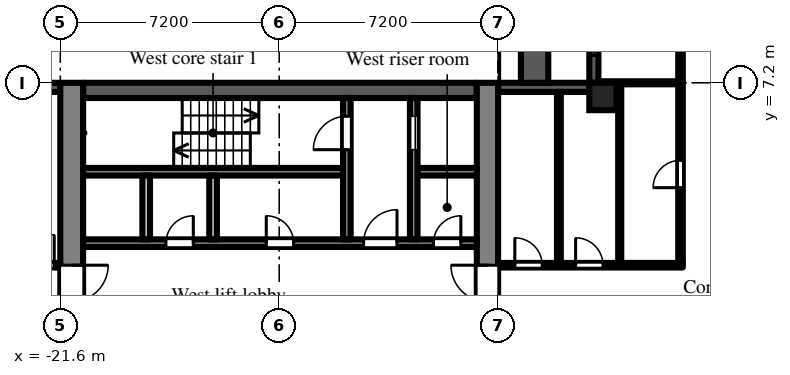
"""IFC4 building model, lengths in metres.
Left out: names, types, materials, properties, quantities, classifications, styles, units other than length and angle.
Written with IfcOpenShell. Run it as: python <this file> out.ifc"""

import sys

from ifc_helpers import new_model, si_unit, direction, frame, frame_2d, origin, origin_2d, place, context, subcontext, project, spatial, rectangle, extrude, element, fill, save


model = new_model("IFC4")
c1 = context("Model", 3, precision=1e-05, world=origin(), true_north=direction((0.0, 1.0)))
c2 = subcontext(c1, "Body", "Model", "MODEL_VIEW")
j1 = project(units=[si_unit("LENGTHUNIT", "METRE"), si_unit("PLANEANGLEUNIT", "RADIAN")], contexts=[c1])
p1 = place(None, origin())
s1 = spatial("IfcSite", under=j1, at=p1, CompositionType="ELEMENT")
p2 = place(p1, origin())
s2 = spatial("IfcBuilding", under=s1, at=p2, CompositionType="ELEMENT")
p3 = place(p2, frame((0.0, 0.0, 59.7)))
s3 = spatial("IfcBuildingStorey", under=s2, at=p3, CompositionType="ELEMENT", Elevation=59.7)
p4 = place(p3, frame((-3.75, 6.75, 0.0), z_axis=(0.0, 0.0, 1.0), x_axis=(1.0, 0.0, 0.0)))
e1 = element("IfcColumn", 1, at=p4, inside=s3, PredefinedType="COLUMN", context=c2, shape_type="SweptSolid", body=[
    extrude(rectangle(XDim=0.9, YDim=0.9, at=origin_2d()), origin(), (0.0, 0.0, 1.0), 3.0),
])
p5 = place(p3, frame((-4.05, 14.4, 0.0), z_axis=(0.0, 0.0, 1.0), x_axis=(0.0, -1.0, 0.0)))
e2 = element("IfcWall", 2, at=p5, inside=s3, PredefinedType="SOLIDWALL", context=c2, shape_type="SweptSolid", body=[
    extrude(rectangle(XDim=7.2, YDim=0.3, at=frame_2d((3.6, 0.0))), origin(), (0.0, 0.0, 1.0), 2.55),
])
p6 = place(p5, frame((3.0, 0.0, 0.0)))
e3 = element("IfcOpeningElement", 3, at=p6, cuts=e2, PredefinedType="OPENING", context=c2, shape_type="SweptSolid", body=[
    extrude(rectangle(XDim=1.2, YDim=2.05, at=frame_2d((0.6, 1.025))), frame((0.0, 0.16, 0.0), z_axis=(0.0, -1.0, 0.0), x_axis=(1.0, 0.0, 0.0)), (0.0, 0.0, 1.0), 0.32),
])
p7 = place(p5, frame((0.9, 0.0, 0.2)))
e4 = element("IfcOpeningElement", 4, at=p7, cuts=e2, PredefinedType="OPENING", context=c2, shape_type="SweptSolid", body=[
    extrude(rectangle(XDim=1.8, YDim=1.85, at=frame_2d((0.9, 0.925))), frame((0.0, 0.16, 0.0), z_axis=(0.0, -1.0, 0.0), x_axis=(1.0, 0.0, 0.0)), (0.0, 0.0, 1.0), 0.32),
])
p8 = place(p5, frame((4.5, 0.0, 0.2)))
e5 = element("IfcOpeningElement", 5, at=p8, cuts=e2, PredefinedType="OPENING", context=c2, shape_type="SweptSolid", body=[
    extrude(rectangle(XDim=1.8, YDim=1.85, at=frame_2d((0.9, 0.925))), frame((0.0, 0.16, 0.0), z_axis=(0.0, -1.0, 0.0), x_axis=(1.0, 0.0, 0.0)), (0.0, 0.0, 1.0), 0.32),
])
p9 = place(p3, frame((-4.2, 7.05, 0.0), z_axis=(0.0, 0.0, 1.0), x_axis=(-1.0, 0.0, 0.0)))
e6 = element("IfcWall", 6, at=p9, inside=s3, PredefinedType="SOLIDWALL", context=c2, shape_type="SweptSolid", body=[
    extrude(rectangle(XDim=3.0, YDim=0.3, at=frame_2d((1.5, 0.0))), origin(), (0.0, 0.0, 1.0), 2.55),
])
p10 = place(p3, frame((-21.6, 7.05, 0.0), z_axis=(0.0, 0.0, 1.0), x_axis=(-1.0, 0.0, 0.0)))
e7 = element("IfcWall", 7, at=p10, inside=s3, PredefinedType="SOLIDWALL", context=c2, shape_type="SweptSolid", body=[
    extrude(rectangle(XDim=2.7, YDim=0.3, at=frame_2d((1.35, 0.0))), origin(), (0.0, 0.0, 1.0), 2.1),
])
p11 = place(p10, frame((0.75, 0.0, 0.2)))
e8 = element("IfcOpeningElement", 8, at=p11, cuts=e7, PredefinedType="OPENING", context=c2, shape_type="SweptSolid", body=[
    extrude(rectangle(XDim=1.2, YDim=1.85, at=frame_2d((0.6, 0.925))), frame((0.0, 0.16, 0.0), z_axis=(0.0, -1.0, 0.0), x_axis=(1.0, 0.0, 0.0)), (0.0, 0.0, 1.0), 0.32),
])
p12 = place(p3, frame((-6.0, 7.2, 0.0), z_axis=(0.0, 0.0, 1.0), x_axis=(0.0, 1.0, 0.0)))
e9 = element("IfcWall", 9, at=p12, inside=s3, PredefinedType="PARAPET", context=c2, shape_type="SweptSolid", body=[
    extrude(rectangle(XDim=7.2, YDim=0.9, at=frame_2d((3.6, 0.0))), origin(), (0.0, 0.0, 1.0), 0.8),
])
p13 = place(p3, frame((-7.55, -7.2, 0.0), z_axis=(0.0, 0.0, 1.0), x_axis=(0.0, 1.0, 0.0)))
e10 = element("IfcWall", 10, at=p13, inside=s3, PredefinedType="SHEAR", context=c2, shape_type="SweptSolid", body=[
    extrude(rectangle(XDim=14.4, YDim=0.7, at=frame_2d((7.2, 0.0))), origin(), (0.0, 0.0, 1.0), 2.55),
])
p14 = place(p13, frame((6.0, 0.0, 0.0)))
e11 = element("IfcOpeningElement", 11, at=p14, cuts=e10, PredefinedType="OPENING", context=c2, shape_type="SweptSolid", body=[
    extrude(rectangle(XDim=2.4, YDim=2.2, at=frame_2d((1.2, 1.1))), frame((0.0, 0.36, 0.0), z_axis=(0.0, -1.0, 0.0), x_axis=(1.0, 0.0, 0.0)), (0.0, 0.0, 1.0), 0.72),
])
p15 = place(p3, frame((-21.225, -7.2, 0.0), z_axis=(0.0, 0.0, 1.0), x_axis=(0.0, 1.0, 0.0)))
e12 = element("IfcWall", 12, at=p15, inside=s3, PredefinedType="SHEAR", context=c2, shape_type="SweptSolid", body=[
    extrude(rectangle(XDim=14.4, YDim=0.75, at=frame_2d((7.2, 0.0))), origin(), (0.0, 0.0, 1.0), 2.55),
])
p16 = place(p15, frame((6.0, 0.0, 0.0)))
e13 = element("IfcOpeningElement", 13, at=p16, cuts=e12, PredefinedType="OPENING", context=c2, shape_type="SweptSolid", body=[
    extrude(rectangle(XDim=2.4, YDim=2.2, at=frame_2d((1.2, 1.1))), frame((0.0, 0.385, 0.0), z_axis=(0.0, -1.0, 0.0), x_axis=(1.0, 0.0, 0.0)), (0.0, 0.0, 1.0), 0.77),
])
p17 = place(p3, frame((-7.9, 6.95, 0.0), z_axis=(0.0, 0.0, 1.0), x_axis=(-1.0, 0.0, 0.0)))
e14 = element("IfcWall", 14, at=p17, inside=s3, PredefinedType="SHEAR", context=c2, shape_type="SweptSolid", body=[
    extrude(rectangle(XDim=12.95, YDim=0.5, at=frame_2d((6.475, 0.0))), origin(), (0.0, 0.0, 1.0), 2.55),
])
p18 = place(p3, frame((-7.9, 1.925, 0.0), z_axis=(0.0, 0.0, 1.0), x_axis=(-1.0, 0.0, 0.0)))
e15 = element("IfcWall", 15, at=p18, inside=s3, PredefinedType="SHEAR", context=c2, shape_type="SweptSolid", body=[
    extrude(rectangle(XDim=12.95, YDim=0.25, at=frame_2d((6.475, 0.0))), origin(), (0.0, 0.0, 1.0), 2.55),
])
p19 = place(p18, frame((0.525, 0.0, 0.0)))
e16 = element("IfcOpeningElement", 16, at=p19, cuts=e15, PredefinedType="OPENING", context=c2, shape_type="SweptSolid", body=[
    extrude(rectangle(XDim=0.9, YDim=2.1, at=frame_2d((0.45, 1.05))), frame((0.0, 0.135, 0.0), z_axis=(0.0, -1.0, 0.0), x_axis=(1.0, 0.0, 0.0)), (0.0, 0.0, 1.0), 0.27),
])
p20 = place(p18, frame((2.625, 0.0, 0.0)))
e17 = element("IfcOpeningElement", 17, at=p20, cuts=e15, PredefinedType="OPENING", context=c2, shape_type="SweptSolid", body=[
    extrude(rectangle(XDim=1.1, YDim=2.1, at=frame_2d((0.55, 1.05))), frame((0.0, 0.135, 0.0), z_axis=(0.0, -1.0, 0.0), x_axis=(1.0, 0.0, 0.0)), (0.0, 0.0, 1.0), 0.27),
])
p21 = place(p18, frame((6.025, 0.0, 0.0)))
e18 = element("IfcOpeningElement", 18, at=p21, cuts=e15, PredefinedType="OPENING", context=c2, shape_type="SweptSolid", body=[
    extrude(rectangle(XDim=0.9, YDim=2.1, at=frame_2d((0.45, 1.05))), frame((0.0, 0.135, 0.0), z_axis=(0.0, -1.0, 0.0), x_axis=(1.0, 0.0, 0.0)), (0.0, 0.0, 1.0), 0.27),
])
p22 = place(p18, frame((9.325, 0.0, 0.0)))
e19 = element("IfcOpeningElement", 19, at=p22, cuts=e15, PredefinedType="OPENING", context=c2, shape_type="SweptSolid", body=[
    extrude(rectangle(XDim=0.9, YDim=2.1, at=frame_2d((0.45, 1.05))), frame((0.0, 0.135, 0.0), z_axis=(0.0, -1.0, 0.0), x_axis=(1.0, 0.0, 0.0)), (0.0, 0.0, 1.0), 0.27),
])
p23 = place(p3, frame((-7.9, 4.275, 0.0), z_axis=(0.0, 0.0, 1.0), x_axis=(-1.0, 0.0, 0.0)))
e20 = element("IfcWall", 20, at=p23, inside=s3, PredefinedType="SHEAR", context=c2, shape_type="SweptSolid", body=[
    extrude(rectangle(XDim=1.95, YDim=0.25, at=frame_2d((0.975, 0.0))), origin(), (0.0, 0.0, 1.0), 2.55),
])
p24 = place(p3, frame((-12.3, 4.275, 0.0), z_axis=(0.0, 0.0, 1.0), x_axis=(-1.0, 0.0, 0.0)))
e21 = element("IfcWall", 21, at=p24, inside=s3, PredefinedType="SHEAR", context=c2, shape_type="SweptSolid", body=[
    extrude(rectangle(XDim=8.55, YDim=0.25, at=frame_2d((4.275, 0.0))), origin(), (0.0, 0.0, 1.0), 2.55),
])
p25 = place(p3, frame((-9.975, 2.05, 0.0), z_axis=(0.0, 0.0, 1.0), x_axis=(0.0, 1.0, 0.0)))
e22 = element("IfcWall", 22, at=p25, inside=s3, PredefinedType="SHEAR", context=c2, shape_type="SweptSolid", body=[
    extrude(rectangle(XDim=4.65, YDim=0.25, at=frame_2d((2.325, 0.0))), origin(), (0.0, 0.0, 1.0), 2.55),
])
p26 = place(p25, frame((2.95, 0.0, 0.0)))
e23 = element("IfcOpeningElement", 23, at=p26, cuts=e22, PredefinedType="OPENING", context=c2, shape_type="SweptSolid", body=[
    extrude(rectangle(XDim=1.1, YDim=2.1, at=frame_2d((0.55, 1.05))), frame((0.0, 0.135, 0.0), z_axis=(0.0, -1.0, 0.0), x_axis=(1.0, 0.0, 0.0)), (0.0, 0.0, 1.0), 0.27),
])
p27 = place(p3, frame((-12.175, 2.05, 0.0), z_axis=(0.0, 0.0, 1.0), x_axis=(0.0, 1.0, 0.0)))
e24 = element("IfcWall", 24, at=p27, inside=s3, PredefinedType="SHEAR", context=c2, shape_type="SweptSolid", body=[
    extrude(rectangle(XDim=4.65, YDim=0.25, at=frame_2d((2.325, 0.0))), origin(), (0.0, 0.0, 1.0), 2.55),
])
p28 = place(p27, frame((2.95, 0.0, 0.0)))
e25 = element("IfcOpeningElement", 25, at=p28, cuts=e24, PredefinedType="OPENING", context=c2, shape_type="SweptSolid", body=[
    extrude(rectangle(XDim=1.1, YDim=2.1, at=frame_2d((0.55, 1.05))), frame((0.0, 0.135, 0.0), z_axis=(0.0, -1.0, 0.0), x_axis=(1.0, 0.0, 0.0)), (0.0, 0.0, 1.0), 0.27),
])
for number, where, z_axis, x_axis in (
    (26, (-16.575, 2.05, 0.0), (0.0, 0.0, 1.0), (0.0, 1.0, 0.0)),
    (27, (-18.775, 2.05, 0.0), (0.0, 0.0, 1.0), (0.0, 1.0, 0.0)),
):
    element("IfcWall", number, at=place(p3, frame(where, z_axis=z_axis, x_axis=x_axis)), inside=s3, PredefinedType="PARTITIONING", context=c2, shape_type="SweptSolid", body=[
        extrude(rectangle(XDim=2.1, YDim=0.25, at=frame_2d((1.05, 0.0))), origin(), (0.0, 0.0, 1.0), 2.55),
    ])
p29 = place(p3, frame((-36.5, 1.2, 0.0), z_axis=(0.0, 0.0, 1.0), x_axis=(1.0, 0.0, 0.0)))
e28 = element("IfcWall", 28, at=p29, inside=s3, PredefinedType="PARTITIONING", context=c2, shape_type="SweptSolid", body=[
    extrude(rectangle(XDim=14.9, YDim=0.15, at=frame_2d((7.45, 0.0))), origin(), (0.0, 0.0, 1.0), 2.55),
])
p30 = place(p29, frame((13.7, 0.0, 0.0)))
e29 = element("IfcOpeningElement", 29, at=p30, cuts=e28, PredefinedType="OPENING", context=c2, shape_type="SweptSolid", body=[
    extrude(rectangle(XDim=1.0, YDim=2.1, at=frame_2d((0.5, 1.05))), frame((0.0, 0.085, 0.0), z_axis=(0.0, -1.0, 0.0), x_axis=(1.0, 0.0, 0.0)), (0.0, 0.0, 1.0), 0.17),
])
p31 = place(p29, frame((8.19, 0.0, 0.0)))
e30 = element("IfcOpeningElement", 30, at=p31, cuts=e28, PredefinedType="OPENING", context=c2, shape_type="SweptSolid", body=[
    extrude(rectangle(XDim=1.0, YDim=2.1, at=frame_2d((0.5, 1.05))), frame((0.0, 0.085, 0.0), z_axis=(0.0, -1.0, 0.0), x_axis=(1.0, 0.0, 0.0)), (0.0, 0.0, 1.0), 0.17),
])
p32 = place(p29, frame((1.15, 0.0, 0.0)))
e31 = element("IfcOpeningElement", 31, at=p32, cuts=e28, PredefinedType="OPENING", context=c2, shape_type="SweptSolid", body=[
    extrude(rectangle(XDim=1.8, YDim=2.1, at=frame_2d((0.9, 1.05))), frame((0.0, 0.085, 0.0), z_axis=(0.0, -1.0, 0.0), x_axis=(1.0, 0.0, 0.0)), (0.0, 0.0, 1.0), 0.17),
])
p33 = place(p3, frame((-7.2, 1.2, 0.0), z_axis=(0.0, 0.0, 1.0), x_axis=(1.0, 0.0, 0.0)))
e32 = element("IfcWall", 32, at=p33, inside=s3, PredefinedType="PARTITIONING", context=c2, shape_type="SweptSolid", body=[
    extrude(rectangle(XDim=6.075, YDim=0.15, at=frame_2d((3.038, 0.0))), origin(), (0.0, 0.0, 1.0), 2.55),
])
p34 = place(p33, frame((2.55, 0.0, 0.0)))
e33 = element("IfcOpeningElement", 33, at=p34, cuts=e32, PredefinedType="OPENING", context=c2, shape_type="SweptSolid", body=[
    extrude(rectangle(XDim=0.9, YDim=2.1, at=frame_2d((0.45, 1.05))), frame((0.0, 0.085, 0.0), z_axis=(0.0, -1.0, 0.0), x_axis=(1.0, 0.0, 0.0)), (0.0, 0.0, 1.0), 0.17),
])
p35 = place(p33, frame((0.55, 0.0, 0.0)))
e34 = element("IfcOpeningElement", 34, at=p35, cuts=e32, PredefinedType="OPENING", context=c2, shape_type="SweptSolid", body=[
    extrude(rectangle(XDim=0.9, YDim=2.1, at=frame_2d((0.45, 1.05))), frame((0.0, 0.085, 0.0), z_axis=(0.0, -1.0, 0.0), x_axis=(1.0, 0.0, 0.0)), (0.0, 0.0, 1.0), 0.17),
])
p36 = place(p3, frame((-5.2, 1.275, 0.0), z_axis=(0.0, 0.0, 1.0), x_axis=(0.0, 1.0, 0.0)))
e35 = element("IfcWall", 35, at=p36, inside=s3, PredefinedType="PARTITIONING", context=c2, shape_type="SweptSolid", body=[
    extrude(rectangle(XDim=5.625, YDim=0.125, at=frame_2d((2.812, 0.0))), origin(), (0.0, 0.0, 1.0), 2.55),
])
p37 = place(p3, frame((-3.9, 7.2, 0.0), z_axis=(0.0, 0.0, 1.0), x_axis=(1.0, 0.0, 0.0)))
e36 = element("IfcWall", 36, at=p37, inside=s3, PredefinedType="PARTITIONING", context=c2, shape_type="SweptSolid", body=[
    extrude(rectangle(XDim=2.625, YDim=0.1, at=frame_2d((1.312, 0.0))), origin(), (0.0, 0.0, 1.0), 2.55),
])
p38 = place(p3, frame((-3.2, 1.275, 0.0), z_axis=(0.0, 0.0, 1.0), x_axis=(0.0, 1.0, 0.0)))
e37 = element("IfcWall", 37, at=p38, inside=s3, PredefinedType="PARTITIONING", context=c2, shape_type="SweptSolid", body=[
    extrude(rectangle(XDim=5.875, YDim=0.1, at=frame_2d((2.938, 0.0))), origin(), (0.0, 0.0, 1.0), 2.55),
])
p39 = place(p3, frame((-1.2, 1.275, 0.0), z_axis=(0.0, 0.0, 1.0), x_axis=(0.0, 1.0, 0.0)))
e38 = element("IfcWall", 38, at=p39, inside=s3, PredefinedType="PARTITIONING", context=c2, shape_type="SweptSolid", body=[
    extrude(rectangle(XDim=35.225, YDim=0.15, at=frame_2d((17.613, 0.0))), origin(), (0.0, 0.0, 1.0), 2.55),
])
p40 = place(p39, frame((2.475, 0.0, 0.0)))
e39 = element("IfcOpeningElement", 39, at=p40, cuts=e38, PredefinedType="OPENING", context=c2, shape_type="SweptSolid", body=[
    extrude(rectangle(XDim=0.9, YDim=2.1, at=frame_2d((0.45, 1.05))), frame((0.0, 0.085, 0.0), z_axis=(0.0, -1.0, 0.0), x_axis=(1.0, 0.0, 0.0)), (0.0, 0.0, 1.0), 0.17),
])
p41 = place(p39, frame((11.275, 0.0, 0.0)))
e40 = element("IfcOpeningElement", 40, at=p41, cuts=e38, PredefinedType="OPENING", context=c2, shape_type="SweptSolid", body=[
    extrude(rectangle(XDim=0.9, YDim=2.1, at=frame_2d((0.45, 1.05))), frame((0.0, 0.085, 0.0), z_axis=(0.0, -1.0, 0.0), x_axis=(1.0, 0.0, 0.0)), (0.0, 0.0, 1.0), 0.17),
])
p42 = place(p39, frame((7.675, 0.0, 0.0)))
e41 = element("IfcOpeningElement", 41, at=p42, cuts=e38, PredefinedType="OPENING", context=c2, shape_type="SweptSolid", body=[
    extrude(rectangle(XDim=0.9, YDim=2.1, at=frame_2d((0.45, 1.05))), frame((0.0, 0.085, 0.0), z_axis=(0.0, -1.0, 0.0), x_axis=(1.0, 0.0, 0.0)), (0.0, 0.0, 1.0), 0.17),
])
p43 = place(p39, frame((19.125, 0.0, 0.0)))
e42 = element("IfcOpeningElement", 42, at=p43, cuts=e38, PredefinedType="OPENING", context=c2, shape_type="SweptSolid", body=[
    extrude(rectangle(XDim=1.0, YDim=2.1, at=frame_2d((0.5, 1.05))), frame((0.0, 0.085, 0.0), z_axis=(0.0, -1.0, 0.0), x_axis=(1.0, 0.0, 0.0)), (0.0, 0.0, 1.0), 0.17),
])
p44 = place(p39, frame((21.675, 0.0, 0.0)))
e43 = element("IfcOpeningElement", 43, at=p44, cuts=e38, PredefinedType="OPENING", context=c2, shape_type="SweptSolid", body=[
    extrude(rectangle(XDim=0.9, YDim=2.1, at=frame_2d((0.45, 1.05))), frame((0.0, 0.085, 0.0), z_axis=(0.0, -1.0, 0.0), x_axis=(1.0, 0.0, 0.0)), (0.0, 0.0, 1.0), 0.17),
])
p45 = place(p39, frame((29.925, 0.0, 0.0)))
e44 = element("IfcOpeningElement", 44, at=p45, cuts=e38, PredefinedType="OPENING", context=c2, shape_type="SweptSolid", body=[
    extrude(rectangle(XDim=1.0, YDim=2.1, at=frame_2d((0.5, 1.05))), frame((0.0, 0.085, 0.0), z_axis=(0.0, -1.0, 0.0), x_axis=(1.0, 0.0, 0.0)), (0.0, 0.0, 1.0), 0.17),
])
p46 = place(p39, frame((32.275, 0.0, 0.0)))
e45 = element("IfcOpeningElement", 45, at=p46, cuts=e38, PredefinedType="OPENING", context=c2, shape_type="SweptSolid", body=[
    extrude(rectangle(XDim=1.8, YDim=2.1, at=frame_2d((0.9, 1.05))), frame((0.0, 0.085, 0.0), z_axis=(0.0, -1.0, 0.0), x_axis=(1.0, 0.0, 0.0)), (0.0, 0.0, 1.0), 0.17),
])
p47 = place(p8, origin())
e46 = element("IfcWindow", 46, at=p47, inside=s3, PartitioningType="SINGLE_PANEL", PredefinedType="WINDOW", context=c2, shape_type="SweptSolid", body=[
    extrude(rectangle(XDim=1.8, YDim=1.85, at=frame_2d((0.9, 0.925))), frame((0.0, 0.03, 0.0), z_axis=(0.0, -1.0, 0.0), x_axis=(1.0, 0.0, 0.0)), (0.0, 0.0, 1.0), 0.06),
])
fill(e5, e46)
p48 = place(p26, origin())
e47 = element("IfcDoor", 47, at=p48, inside=s3, OperationType="SLIDING_TO_LEFT", PredefinedType="DOOR", context=c2, shape_type="SweptSolid", body=[
    extrude(rectangle(XDim=1.1, YDim=2.1, at=frame_2d((0.55, 1.05))), frame((0.0, 0.025, 0.0), z_axis=(0.0, -1.0, 0.0), x_axis=(1.0, 0.0, 0.0)), (0.0, 0.0, 1.0), 0.05),
])
fill(e23, e47)
p49 = place(p28, origin())
e48 = element("IfcDoor", 48, at=p49, inside=s3, OperationType="SINGLE_SWING_LEFT", PredefinedType="DOOR", context=c2, shape_type="SweptSolid", body=[
    extrude(rectangle(XDim=1.1, YDim=2.1, at=frame_2d((0.55, 1.05))), frame((0.0, 0.025, 0.0), z_axis=(0.0, -1.0, 0.0), x_axis=(1.0, 0.0, 0.0)), (0.0, 0.0, 1.0), 0.05),
])
fill(e25, e48)
p50 = place(p19, frame((0.9, 0.0, 0.0), z_axis=(0.0, 0.0, 1.0), x_axis=(-1.0, 0.0, 0.0)))
e49 = element("IfcDoor", 49, at=p50, inside=s3, OperationType="SINGLE_SWING_RIGHT", PredefinedType="DOOR", context=c2, shape_type="SweptSolid", body=[
    extrude(rectangle(XDim=0.9, YDim=2.1, at=frame_2d((0.45, 1.05))), frame((0.0, 0.025, 0.0), z_axis=(0.0, -1.0, 0.0), x_axis=(1.0, 0.0, 0.0)), (0.0, 0.0, 1.0), 0.05),
])
fill(e16, e49)
p51 = place(p20, frame((1.1, 0.0, 0.0), z_axis=(0.0, 0.0, 1.0), x_axis=(-1.0, 0.0, 0.0)))
e50 = element("IfcDoor", 50, at=p51, inside=s3, OperationType="SINGLE_SWING_RIGHT", PredefinedType="DOOR", context=c2, shape_type="SweptSolid", body=[
    extrude(rectangle(XDim=1.1, YDim=2.1, at=frame_2d((0.55, 1.05))), frame((0.0, 0.025, 0.0), z_axis=(0.0, -1.0, 0.0), x_axis=(1.0, 0.0, 0.0)), (0.0, 0.0, 1.0), 0.05),
])
fill(e17, e50)
p52 = place(p14, origin())
e51 = element("IfcDoor", 51, at=p52, inside=s3, OperationType="DOUBLE_DOOR_DOUBLE_SWING", PredefinedType="DOOR", context=c2, shape_type="SweptSolid", body=[
    extrude(rectangle(XDim=2.4, YDim=2.2, at=frame_2d((1.2, 1.1))), frame((0.0, 0.025, 0.0), z_axis=(0.0, -1.0, 0.0), x_axis=(1.0, 0.0, 0.0)), (0.0, 0.0, 1.0), 0.05),
])
fill(e11, e51)
p53 = place(p16, frame((2.4, 0.0, 0.0), z_axis=(0.0, 0.0, 1.0), x_axis=(-1.0, 0.0, 0.0)))
e52 = element("IfcDoor", 52, at=p53, inside=s3, OperationType="DOUBLE_DOOR_DOUBLE_SWING", PredefinedType="DOOR", context=c2, shape_type="SweptSolid", body=[
    extrude(rectangle(XDim=2.4, YDim=2.2, at=frame_2d((1.2, 1.1))), frame((0.0, 0.025, 0.0), z_axis=(0.0, -1.0, 0.0), x_axis=(1.0, 0.0, 0.0)), (0.0, 0.0, 1.0), 0.05),
])
fill(e13, e52)
p54 = place(p21, frame((0.9, 0.0, 0.0), z_axis=(0.0, 0.0, 1.0), x_axis=(-1.0, 0.0, 0.0)))
e53 = element("IfcDoor", 53, at=p54, inside=s3, OperationType="SINGLE_SWING_LEFT", PredefinedType="DOOR", context=c2, shape_type="SweptSolid", body=[
    extrude(rectangle(XDim=0.9, YDim=2.1, at=frame_2d((0.45, 1.05))), frame((0.0, 0.025, 0.0), z_axis=(0.0, -1.0, 0.0), x_axis=(1.0, 0.0, 0.0)), (0.0, 0.0, 1.0), 0.05),
])
fill(e18, e53)
p55 = place(p22, frame((0.9, 0.0, 0.0), z_axis=(0.0, 0.0, 1.0), x_axis=(-1.0, 0.0, 0.0)))
e54 = element("IfcDoor", 54, at=p55, inside=s3, OperationType="SINGLE_SWING_RIGHT", PredefinedType="DOOR", context=c2, shape_type="SweptSolid", body=[
    extrude(rectangle(XDim=0.9, YDim=2.1, at=frame_2d((0.45, 1.05))), frame((0.0, 0.025, 0.0), z_axis=(0.0, -1.0, 0.0), x_axis=(1.0, 0.0, 0.0)), (0.0, 0.0, 1.0), 0.05),
])
fill(e19, e54)
p56 = place(p40, origin())
e55 = element("IfcDoor", 55, at=p56, inside=s3, OperationType="SINGLE_SWING_LEFT", PredefinedType="DOOR", context=c2, shape_type="SweptSolid", body=[
    extrude(rectangle(XDim=0.9, YDim=2.1, at=frame_2d((0.45, 1.05))), frame((0.0, 0.025, 0.0), z_axis=(0.0, -1.0, 0.0), x_axis=(1.0, 0.0, 0.0)), (0.0, 0.0, 1.0), 0.05),
])
fill(e39, e55)
p57 = place(p34, origin())
e56 = element("IfcDoor", 56, at=p57, inside=s3, OperationType="SINGLE_SWING_LEFT", PredefinedType="DOOR", context=c2, shape_type="SweptSolid", body=[
    extrude(rectangle(XDim=0.9, YDim=2.1, at=frame_2d((0.45, 1.05))), frame((0.0, 0.025, 0.0), z_axis=(0.0, -1.0, 0.0), x_axis=(1.0, 0.0, 0.0)), (0.0, 0.0, 1.0), 0.05),
])
fill(e33, e56)
p58 = place(p35, origin())
e57 = element("IfcDoor", 57, at=p58, inside=s3, OperationType="SINGLE_SWING_LEFT", PredefinedType="DOOR", context=c2, shape_type="SweptSolid", body=[
    extrude(rectangle(XDim=0.9, YDim=2.1, at=frame_2d((0.45, 1.05))), frame((0.0, 0.025, 0.0), z_axis=(0.0, -1.0, 0.0), x_axis=(1.0, 0.0, 0.0)), (0.0, 0.0, 1.0), 0.05),
])
fill(e34, e57)
p59 = place(p30, origin())
e58 = element("IfcDoor", 58, at=p59, inside=s3, OperationType="SINGLE_SWING_RIGHT", PredefinedType="DOOR", context=c2, shape_type="SweptSolid", body=[
    extrude(rectangle(XDim=1.0, YDim=2.1, at=frame_2d((0.5, 1.05))), frame((0.0, 0.025, 0.0), z_axis=(0.0, -1.0, 0.0), x_axis=(1.0, 0.0, 0.0)), (0.0, 0.0, 1.0), 0.05),
])
fill(e29, e58)
save(model, sys.argv[1])
